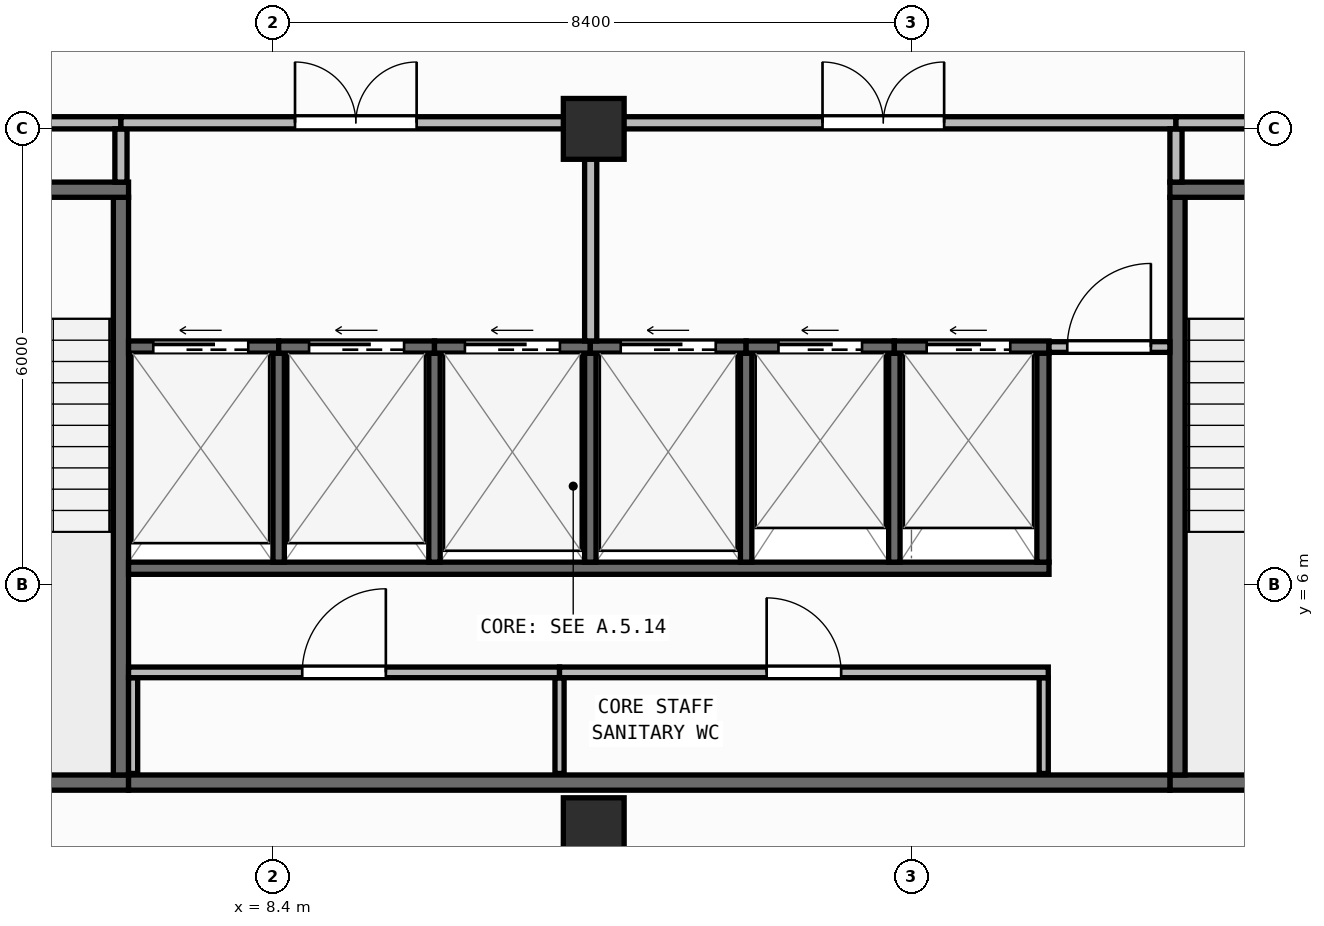
"""IFC4 building model, lengths in metres.
Left out: names, types, materials, properties, quantities, classifications, styles, units other than length and angle.
Written with IfcOpenShell. Run it as: python <this file> out.ifc"""

import sys

from ifc_helpers import new_model, si_unit, direction, frame, frame_2d, origin, origin_2d, place, context, subcontext, project, spatial, rectangle, extrude, element, fill, save


model = new_model("IFC4")
c1 = context("Model", 3, precision=1e-05, world=origin(), true_north=direction((0.0, 1.0)))
c2 = subcontext(c1, "Body", "Model", "MODEL_VIEW")
j1 = project(units=[si_unit("LENGTHUNIT", "METRE"), si_unit("PLANEANGLEUNIT", "RADIAN")], contexts=[c1])
p1 = place(None, origin())
s1 = spatial("IfcSite", under=j1, at=p1, CompositionType="ELEMENT")
p2 = place(p1, origin())
s2 = spatial("IfcBuilding", under=s1, at=p2, CompositionType="ELEMENT")
p3 = place(p2, frame((0.0, 0.0, 280.25)))
s3 = spatial("IfcBuildingStorey", under=s2, at=p3, CompositionType="ELEMENT", Elevation=280.25)
for number, where, z_axis, x_axis in (
    (1, (12.62, 2.8, 0.0), (0.0, 0.0, 1.0), (1.0, 0.0, 0.0)),
    (2, (12.62, 12.0, 0.0), (0.0, 0.0, 1.0), (1.0, 0.0, 0.0)),
):
    element("IfcColumn", number, at=place(p3, frame(where, z_axis=z_axis, x_axis=x_axis)), inside=s3, PredefinedType="COLUMN", context=c2, shape_type="SweptSolid", body=[
        extrude(rectangle(XDim=0.8, YDim=0.8, at=origin_2d()), origin(), (0.0, 0.0, 1.0), 3.95),
    ])
p4 = place(p3, frame((2.46, 0.172, 0.0), z_axis=(0.0, 0.0, 1.0), x_axis=(0.997289775118, 0.073573802713, 0.0)))
e3 = element("IfcWall", 3, at=p4, inside=s3, PredefinedType="STANDARD", context=c2, shape_type="SweptSolid", body=[
    extrude(rectangle(XDim=36.379, YDim=0.26, at=frame_2d((18.189, 0.0))), origin(), (0.0, 0.0, 1.0), 3.71),
])
p5 = place(p4, frame((16.989, 0.0, 0.9)))
e4 = element("IfcOpeningElement", 4, at=p5, cuts=e3, PredefinedType="OPENING", context=c2, shape_type="SweptSolid", body=[
    extrude(rectangle(XDim=2.4, YDim=1.65, at=frame_2d((1.2, 0.825))), frame((0.0, 0.14, 0.0), z_axis=(0.0, -1.0, 0.0), x_axis=(1.0, 0.0, 0.0)), (0.0, 0.0, 1.0), 0.28),
])
p6 = place(p3, frame((2.8, 3.4, 0.0), z_axis=(0.0, 0.0, 1.0), x_axis=(1.0, 0.0, 0.0)))
e5 = element("IfcWall", 5, at=p6, inside=s3, PredefinedType="SHEAR", context=c2, shape_type="SweptSolid", body=[
    extrude(rectangle(XDim=3.7, YDim=0.2, at=frame_2d((1.85, 0.0))), origin(), (0.0, 0.0, 1.0), 3.71),
])
p7 = place(p3, frame((6.4, 3.5, 0.0), z_axis=(0.0, 0.0, 1.0), x_axis=(0.0, 1.0, 0.0)))
e6 = element("IfcWall", 6, at=p7, inside=s3, PredefinedType="SHEAR", context=c2, shape_type="SweptSolid", body=[
    extrude(rectangle(XDim=7.6, YDim=0.2, at=frame_2d((3.8, 0.0))), origin(), (0.0, 0.0, 1.0), 3.71),
])
p8 = place(p3, frame((2.8, 11.2, 0.0), z_axis=(0.0, 0.0, 1.0), x_axis=(1.0, 0.0, 0.0)))
e7 = element("IfcWall", 7, at=p8, inside=s3, PredefinedType="SHEAR", context=c2, shape_type="SweptSolid", body=[
    extrude(rectangle(XDim=3.7, YDim=0.2, at=frame_2d((1.85, 0.0))), origin(), (0.0, 0.0, 1.0), 3.71),
])
p9 = place(p8, frame((1.2, 0.0, 0.0)))
e8 = element("IfcOpeningElement", 8, at=p9, cuts=e7, PredefinedType="OPENING", context=c2, shape_type="SweptSolid", body=[
    extrude(rectangle(XDim=1.3, YDim=2.15, at=frame_2d((0.65, 1.075))), frame((0.0, 0.11, 0.0), z_axis=(0.0, -1.0, 0.0), x_axis=(1.0, 0.0, 0.0)), (0.0, 0.0, 1.0), 0.22),
])
p10 = place(p3, frame((20.2, 3.4, 0.0), z_axis=(0.0, 0.0, 1.0), x_axis=(1.0, 0.0, 0.0)))
e9 = element("IfcWall", 9, at=p10, inside=s3, PredefinedType="SHEAR", context=c2, shape_type="SweptSolid", body=[
    extrude(rectangle(XDim=3.7, YDim=0.2, at=frame_2d((1.85, 0.0))), origin(), (0.0, 0.0, 1.0), 3.71),
])
p11 = place(p3, frame((20.3, 3.5, 0.0), z_axis=(0.0, 0.0, 1.0), x_axis=(0.0, 1.0, 0.0)))
e10 = element("IfcWall", 10, at=p11, inside=s3, PredefinedType="SHEAR", context=c2, shape_type="SweptSolid", body=[
    extrude(rectangle(XDim=7.6, YDim=0.2, at=frame_2d((3.8, 0.0))), origin(), (0.0, 0.0, 1.0), 3.71),
])
p12 = place(p3, frame((20.2, 11.2, 0.0), z_axis=(0.0, 0.0, 1.0), x_axis=(1.0, 0.0, 0.0)))
e11 = element("IfcWall", 11, at=p12, inside=s3, PredefinedType="SHEAR", context=c2, shape_type="SweptSolid", body=[
    extrude(rectangle(XDim=3.7, YDim=0.2, at=frame_2d((1.85, 0.0))), origin(), (0.0, 0.0, 1.0), 3.71),
])
p13 = place(p12, frame((1.2, 0.0, 0.0)))
e12 = element("IfcOpeningElement", 12, at=p13, cuts=e11, PredefinedType="OPENING", context=c2, shape_type="SweptSolid", body=[
    extrude(rectangle(XDim=1.3, YDim=2.15, at=frame_2d((0.65, 1.075))), frame((0.0, 0.11, 0.0), z_axis=(0.0, -1.0, 0.0), x_axis=(1.0, 0.0, 0.0)), (0.0, 0.0, 1.0), 0.22),
])
p14 = place(p3, frame((6.5, 3.4, 0.0), z_axis=(0.0, 0.0, 1.0), x_axis=(1.0, 0.0, 0.0)))
e13 = element("IfcWall", 13, at=p14, inside=s3, PredefinedType="SHEAR", context=c2, shape_type="SweptSolid", body=[
    extrude(rectangle(XDim=13.7, YDim=0.2, at=frame_2d((6.85, 0.0))), origin(), (0.0, 0.0, 1.0), 3.71),
])
p15 = place(p3, frame((6.5, 6.22, 0.0), z_axis=(0.0, 0.0, 1.0), x_axis=(1.0, 0.0, 0.0)))
e14 = element("IfcWall", 14, at=p15, inside=s3, PredefinedType="SHEAR", context=c2, shape_type="SweptSolid", body=[
    extrude(rectangle(XDim=12.11, YDim=0.16, at=frame_2d((6.055, 0.0))), origin(), (0.0, 0.0, 1.0), 3.71),
])
p16 = place(p3, frame((18.53, 6.3, 0.0), z_axis=(0.0, 0.0, 1.0), x_axis=(0.0, 1.0, 0.0)))
e15 = element("IfcWall", 15, at=p16, inside=s3, PredefinedType="SHEAR", context=c2, shape_type="SweptSolid", body=[
    extrude(rectangle(XDim=2.75, YDim=0.16, at=frame_2d((1.375, 0.0))), origin(), (0.0, 0.0, 1.0), 3.71),
])
for number, where, z_axis, x_axis in (
    (16, (8.475, 6.3, 0.0), (0.0, 0.0, 1.0), (0.0, 1.0, 0.0)),
    (17, (10.525, 6.3, 0.0), (0.0, 0.0, 1.0), (0.0, 1.0, 0.0)),
    (18, (12.575, 6.3, 0.0), (0.0, 0.0, 1.0), (0.0, 1.0, 0.0)),
    (19, (14.625, 6.3, 0.0), (0.0, 0.0, 1.0), (0.0, 1.0, 0.0)),
    (20, (16.575, 6.3, 0.0), (0.0, 0.0, 1.0), (0.0, 1.0, 0.0)),
):
    element("IfcWall", number, at=place(p3, frame(where, z_axis=z_axis, x_axis=x_axis)), inside=s3, PredefinedType="SHEAR", context=c2, shape_type="SweptSolid", body=[
        extrude(rectangle(XDim=2.75, YDim=0.15, at=frame_2d((1.375, 0.0))), origin(), (0.0, 0.0, 1.0), 3.71),
    ])
p17 = place(p3, frame((6.5, 9.13, 0.0), z_axis=(0.0, 0.0, 1.0), x_axis=(1.0, 0.0, 0.0)))
e21 = element("IfcWall", 21, at=p17, inside=s3, PredefinedType="SHEAR", context=c2, shape_type="SweptSolid", body=[
    extrude(rectangle(XDim=1.975, YDim=0.16, at=frame_2d((0.988, 0.0))), origin(), (0.0, 0.0, 1.0), 3.71),
])
p18 = place(p17, frame((0.325, 0.0, 0.0)))
e22 = element("IfcOpeningElement", 22, at=p18, cuts=e21, PredefinedType="OPENING", context=c2, shape_type="SweptSolid", body=[
    extrude(rectangle(XDim=1.25, YDim=2.15, at=frame_2d((0.625, 1.075))), frame((0.0, 0.09, 0.0), z_axis=(0.0, -1.0, 0.0), x_axis=(1.0, 0.0, 0.0)), (0.0, 0.0, 1.0), 0.18),
])
p19 = place(p3, frame((8.475, 9.13, 0.0), z_axis=(0.0, 0.0, 1.0), x_axis=(1.0, 0.0, 0.0)))
e23 = element("IfcWall", 23, at=p19, inside=s3, PredefinedType="SHEAR", context=c2, shape_type="SweptSolid", body=[
    extrude(rectangle(XDim=2.05, YDim=0.16, at=frame_2d((1.025, 0.0))), origin(), (0.0, 0.0, 1.0), 3.71),
])
p20 = place(p19, frame((0.4, 0.0, 0.0)))
e24 = element("IfcOpeningElement", 24, at=p20, cuts=e23, PredefinedType="OPENING", context=c2, shape_type="SweptSolid", body=[
    extrude(rectangle(XDim=1.25, YDim=2.15, at=frame_2d((0.625, 1.075))), frame((0.0, 0.09, 0.0), z_axis=(0.0, -1.0, 0.0), x_axis=(1.0, 0.0, 0.0)), (0.0, 0.0, 1.0), 0.18),
])
p21 = place(p3, frame((10.525, 9.13, 0.0), z_axis=(0.0, 0.0, 1.0), x_axis=(1.0, 0.0, 0.0)))
e25 = element("IfcWall", 25, at=p21, inside=s3, PredefinedType="SHEAR", context=c2, shape_type="SweptSolid", body=[
    extrude(rectangle(XDim=2.05, YDim=0.16, at=frame_2d((1.025, 0.0))), origin(), (0.0, 0.0, 1.0), 3.71),
])
p22 = place(p21, frame((0.4, 0.0, 0.0)))
e26 = element("IfcOpeningElement", 26, at=p22, cuts=e25, PredefinedType="OPENING", context=c2, shape_type="SweptSolid", body=[
    extrude(rectangle(XDim=1.25, YDim=2.15, at=frame_2d((0.625, 1.075))), frame((0.0, 0.09, 0.0), z_axis=(0.0, -1.0, 0.0), x_axis=(1.0, 0.0, 0.0)), (0.0, 0.0, 1.0), 0.18),
])
p23 = place(p3, frame((12.575, 9.13, 0.0), z_axis=(0.0, 0.0, 1.0), x_axis=(1.0, 0.0, 0.0)))
e27 = element("IfcWall", 27, at=p23, inside=s3, PredefinedType="SHEAR", context=c2, shape_type="SweptSolid", body=[
    extrude(rectangle(XDim=2.05, YDim=0.16, at=frame_2d((1.025, 0.0))), origin(), (0.0, 0.0, 1.0), 3.71),
])
p24 = place(p23, frame((0.4, 0.0, 0.0)))
e28 = element("IfcOpeningElement", 28, at=p24, cuts=e27, PredefinedType="OPENING", context=c2, shape_type="SweptSolid", body=[
    extrude(rectangle(XDim=1.25, YDim=2.15, at=frame_2d((0.625, 1.075))), frame((0.0, 0.09, 0.0), z_axis=(0.0, -1.0, 0.0), x_axis=(1.0, 0.0, 0.0)), (0.0, 0.0, 1.0), 0.18),
])
p25 = place(p3, frame((14.625, 9.13, 0.0), z_axis=(0.0, 0.0, 1.0), x_axis=(1.0, 0.0, 0.0)))
e29 = element("IfcWall", 29, at=p25, inside=s3, PredefinedType="SHEAR", context=c2, shape_type="SweptSolid", body=[
    extrude(rectangle(XDim=1.95, YDim=0.16, at=frame_2d((0.975, 0.0))), origin(), (0.0, 0.0, 1.0), 3.71),
])
p26 = place(p25, frame((0.425, 0.0, 0.0)))
e30 = element("IfcOpeningElement", 30, at=p26, cuts=e29, PredefinedType="OPENING", context=c2, shape_type="SweptSolid", body=[
    extrude(rectangle(XDim=1.1, YDim=2.15, at=frame_2d((0.55, 1.075))), frame((0.0, 0.09, 0.0), z_axis=(0.0, -1.0, 0.0), x_axis=(1.0, 0.0, 0.0)), (0.0, 0.0, 1.0), 0.18),
])
p27 = place(p3, frame((16.575, 9.13, 0.0), z_axis=(0.0, 0.0, 1.0), x_axis=(1.0, 0.0, 0.0)))
e31 = element("IfcWall", 31, at=p27, inside=s3, PredefinedType="SHEAR", context=c2, shape_type="SweptSolid", body=[
    extrude(rectangle(XDim=2.035, YDim=0.16, at=frame_2d((1.018, 0.0))), origin(), (0.0, 0.0, 1.0), 3.71),
])
p28 = place(p27, frame((0.425, 0.0, 0.0)))
e32 = element("IfcOpeningElement", 32, at=p28, cuts=e31, PredefinedType="OPENING", context=c2, shape_type="SweptSolid", body=[
    extrude(rectangle(XDim=1.1, YDim=2.15, at=frame_2d((0.55, 1.075))), frame((0.0, 0.09, 0.0), z_axis=(0.0, -1.0, 0.0), x_axis=(1.0, 0.0, 0.0)), (0.0, 0.0, 1.0), 0.18),
])
for number, where, z_axis, x_axis in (
    (33, (6.56, 3.52, 0.0), (0.0, 0.0, 1.0), (0.0, 1.0, 0.0)),
    (34, (12.17, 3.52, 0.0), (0.0, 0.0, 1.0), (0.0, 1.0, 0.0)),
    (35, (18.54, 3.52, 0.0), (0.0, 0.0, 1.0), (0.0, 1.0, 0.0)),
):
    element("IfcWall", number, at=place(p3, frame(where, z_axis=z_axis, x_axis=x_axis)), inside=s3, PredefinedType="PARTITIONING", context=c2, shape_type="SweptSolid", body=[
        extrude(rectangle(XDim=1.26, YDim=0.12, at=frame_2d((0.63, 0.0))), origin(), (0.0, 0.0, 1.0), 3.71),
    ])
p29 = place(p3, frame((6.5, 4.85, 0.0), z_axis=(0.0, 0.0, 1.0), x_axis=(1.0, 0.0, 0.0)))
e36 = element("IfcWall", 36, at=p29, inside=s3, PredefinedType="PARTITIONING", context=c2, shape_type="SweptSolid", body=[
    extrude(rectangle(XDim=5.67, YDim=0.14, at=frame_2d((2.835, 0.0))), origin(), (0.0, 0.0, 1.0), 3.71),
])
p30 = place(p29, frame((2.285, 0.0, 0.0)))
e37 = element("IfcOpeningElement", 37, at=p30, cuts=e36, PredefinedType="OPENING", context=c2, shape_type="SweptSolid", body=[
    extrude(rectangle(XDim=1.1, YDim=2.1, at=frame_2d((0.55, 1.05))), frame((0.0, 0.08, 0.0), z_axis=(0.0, -1.0, 0.0), x_axis=(1.0, 0.0, 0.0)), (0.0, 0.0, 1.0), 0.16),
])
p31 = place(p3, frame((12.17, 4.85, 0.0), z_axis=(0.0, 0.0, 1.0), x_axis=(1.0, 0.0, 0.0)))
e38 = element("IfcWall", 38, at=p31, inside=s3, PredefinedType="PARTITIONING", context=c2, shape_type="SweptSolid", body=[
    extrude(rectangle(XDim=6.43, YDim=0.14, at=frame_2d((3.215, 0.0))), origin(), (0.0, 0.0, 1.0), 3.71),
])
p32 = place(p31, frame((2.725, 0.0, 0.0)))
e39 = element("IfcOpeningElement", 39, at=p32, cuts=e38, PredefinedType="OPENING", context=c2, shape_type="SweptSolid", body=[
    extrude(rectangle(XDim=0.98, YDim=2.1, at=frame_2d((0.49, 1.05))), frame((0.0, 0.08, 0.0), z_axis=(0.0, -1.0, 0.0), x_axis=(1.0, 0.0, 0.0)), (0.0, 0.0, 1.0), 0.16),
])
p33 = place(p3, frame((18.61, 9.13, 0.0), z_axis=(0.0, 0.0, 1.0), x_axis=(1.0, 0.0, 0.0)))
e40 = element("IfcWall", 40, at=p33, inside=s3, PredefinedType="PARTITIONING", context=c2, shape_type="SweptSolid", body=[
    extrude(rectangle(XDim=1.59, YDim=0.14, at=frame_2d((0.795, 0.0))), origin(), (0.0, 0.0, 1.0), 3.71),
])
p34 = place(p33, frame((0.24, 0.0, 0.0)))
e41 = element("IfcOpeningElement", 41, at=p34, cuts=e40, PredefinedType="OPENING", context=c2, shape_type="SweptSolid", body=[
    extrude(rectangle(XDim=1.1, YDim=2.1, at=frame_2d((0.55, 1.05))), frame((0.0, 0.08, 0.0), z_axis=(0.0, -1.0, 0.0), x_axis=(1.0, 0.0, 0.0)), (0.0, 0.0, 1.0), 0.16),
])
p35 = place(p3, frame((2.8, 12.08, 0.0), z_axis=(0.0, 0.0, 1.0), x_axis=(1.0, 0.0, 0.0)))
e42 = element("IfcWall", 42, at=p35, inside=s3, PredefinedType="PARTITIONING", context=c2, shape_type="SweptSolid", body=[
    extrude(rectangle(XDim=3.6, YDim=0.16, at=frame_2d((1.8, 0.0))), origin(), (0.0, 0.0, 1.0), 3.157),
])
p36 = place(p35, frame((1.0, 0.0, 0.0)))
e43 = element("IfcOpeningElement", 43, at=p36, cuts=e42, PredefinedType="OPENING", context=c2, shape_type="SweptSolid", body=[
    extrude(rectangle(XDim=1.6, YDim=2.05, at=frame_2d((0.8, 1.025))), frame((0.0, 0.09, 0.0), z_axis=(0.0, -1.0, 0.0), x_axis=(1.0, 0.0, 0.0)), (0.0, 0.0, 1.0), 0.18),
])
p37 = place(p3, frame((6.4, 11.3, 0.0), z_axis=(0.0, 0.0, 1.0), x_axis=(0.0, 1.0, 0.0)))
e44 = element("IfcWall", 44, at=p37, inside=s3, PredefinedType="PARTITIONING", context=c2, shape_type="SweptSolid", body=[
    extrude(rectangle(XDim=0.7, YDim=0.16, at=frame_2d((0.35, 0.0))), origin(), (0.0, 0.0, 1.0), 3.71),
])
p38 = place(p3, frame((6.4, 12.08, 0.0), z_axis=(0.0, 0.0, 1.0), x_axis=(1.0, 0.0, 0.0)))
e45 = element("IfcWall", 45, at=p38, inside=s3, PredefinedType="PARTITIONING", context=c2, shape_type="SweptSolid", body=[
    extrude(rectangle(XDim=6.18, YDim=0.16, at=frame_2d((3.09, 0.0))), origin(), (0.0, 0.0, 1.0), 3.157),
])
p39 = place(p38, frame((2.29, 0.0, 0.0)))
e46 = element("IfcOpeningElement", 46, at=p39, cuts=e45, PredefinedType="OPENING", context=c2, shape_type="SweptSolid", body=[
    extrude(rectangle(XDim=1.6, YDim=2.05, at=frame_2d((0.8, 1.025))), frame((0.0, 0.09, 0.0), z_axis=(0.0, -1.0, 0.0), x_axis=(1.0, 0.0, 0.0)), (0.0, 0.0, 1.0), 0.18),
])
p40 = place(p3, frame((12.58, 9.21, 0.0), z_axis=(0.0, 0.0, 1.0), x_axis=(0.0, 1.0, 0.0)))
e47 = element("IfcWall", 47, at=p40, inside=s3, PredefinedType="PARTITIONING", context=c2, shape_type="SweptSolid", body=[
    extrude(rectangle(XDim=2.79, YDim=0.16, at=frame_2d((1.395, 0.0))), origin(), (0.0, 0.0, 1.0), 3.71),
])
p41 = place(p3, frame((12.58, 12.08, 0.0), z_axis=(0.0, 0.0, 1.0), x_axis=(1.0, 0.0, 0.0)))
e48 = element("IfcWall", 48, at=p41, inside=s3, PredefinedType="PARTITIONING", context=c2, shape_type="SweptSolid", body=[
    extrude(rectangle(XDim=7.7, YDim=0.16, at=frame_2d((3.85, 0.0))), origin(), (0.0, 0.0, 1.0), 3.157),
])
p42 = place(p41, frame((3.05, 0.0, 0.0)))
e49 = element("IfcOpeningElement", 49, at=p42, cuts=e48, PredefinedType="OPENING", context=c2, shape_type="SweptSolid", body=[
    extrude(rectangle(XDim=1.6, YDim=2.05, at=frame_2d((0.8, 1.025))), frame((0.0, 0.09, 0.0), z_axis=(0.0, -1.0, 0.0), x_axis=(1.0, 0.0, 0.0)), (0.0, 0.0, 1.0), 0.18),
])
p43 = place(p3, frame((20.28, 11.3, 0.0), z_axis=(0.0, 0.0, 1.0), x_axis=(0.0, 1.0, 0.0)))
e50 = element("IfcWall", 50, at=p43, inside=s3, PredefinedType="PARTITIONING", context=c2, shape_type="SweptSolid", body=[
    extrude(rectangle(XDim=0.7, YDim=0.16, at=frame_2d((0.35, 0.0))), origin(), (0.0, 0.0, 1.0), 3.71),
])
p44 = place(p3, frame((20.28, 12.08, 0.0), z_axis=(0.0, 0.0, 1.0), x_axis=(1.0, 0.0, 0.0)))
e51 = element("IfcWall", 51, at=p44, inside=s3, PredefinedType="PARTITIONING", context=c2, shape_type="SweptSolid", body=[
    extrude(rectangle(XDim=3.62, YDim=0.16, at=frame_2d((1.81, 0.0))), origin(), (0.0, 0.0, 1.0), 3.157),
])
p45 = place(p44, frame((1.01, 0.0, 0.0)))
e52 = element("IfcOpeningElement", 52, at=p45, cuts=e51, PredefinedType="OPENING", context=c2, shape_type="SweptSolid", body=[
    extrude(rectangle(XDim=1.6, YDim=2.05, at=frame_2d((0.8, 1.025))), frame((0.0, 0.09, 0.0), z_axis=(0.0, -1.0, 0.0), x_axis=(1.0, 0.0, 0.0)), (0.0, 0.0, 1.0), 0.18),
])
p46 = place(p18, origin())
e53 = element("IfcDoor", 53, at=p46, inside=s3, OperationType="SLIDING_TO_LEFT", PredefinedType="DOOR", context=c2, shape_type="SweptSolid", body=[
    extrude(rectangle(XDim=1.25, YDim=2.15, at=frame_2d((0.625, 1.075))), frame((0.0, 0.025, 0.0), z_axis=(0.0, -1.0, 0.0), x_axis=(1.0, 0.0, 0.0)), (0.0, 0.0, 1.0), 0.05),
])
fill(e22, e53)
p47 = place(p20, origin())
e54 = element("IfcDoor", 54, at=p47, inside=s3, OperationType="SLIDING_TO_LEFT", PredefinedType="DOOR", context=c2, shape_type="SweptSolid", body=[
    extrude(rectangle(XDim=1.25, YDim=2.15, at=frame_2d((0.625, 1.075))), frame((0.0, 0.025, 0.0), z_axis=(0.0, -1.0, 0.0), x_axis=(1.0, 0.0, 0.0)), (0.0, 0.0, 1.0), 0.05),
])
fill(e24, e54)
p48 = place(p22, origin())
e55 = element("IfcDoor", 55, at=p48, inside=s3, OperationType="SLIDING_TO_LEFT", PredefinedType="DOOR", context=c2, shape_type="SweptSolid", body=[
    extrude(rectangle(XDim=1.25, YDim=2.15, at=frame_2d((0.625, 1.075))), frame((0.0, 0.025, 0.0), z_axis=(0.0, -1.0, 0.0), x_axis=(1.0, 0.0, 0.0)), (0.0, 0.0, 1.0), 0.05),
])
fill(e26, e55)
p49 = place(p24, origin())
e56 = element("IfcDoor", 56, at=p49, inside=s3, OperationType="SLIDING_TO_LEFT", PredefinedType="DOOR", context=c2, shape_type="SweptSolid", body=[
    extrude(rectangle(XDim=1.25, YDim=2.15, at=frame_2d((0.625, 1.075))), frame((0.0, 0.025, 0.0), z_axis=(0.0, -1.0, 0.0), x_axis=(1.0, 0.0, 0.0)), (0.0, 0.0, 1.0), 0.05),
])
fill(e28, e56)
p50 = place(p26, origin())
e57 = element("IfcDoor", 57, at=p50, inside=s3, OperationType="SLIDING_TO_LEFT", PredefinedType="DOOR", context=c2, shape_type="SweptSolid", body=[
    extrude(rectangle(XDim=1.1, YDim=2.15, at=frame_2d((0.55, 1.075))), frame((0.0, 0.025, 0.0), z_axis=(0.0, -1.0, 0.0), x_axis=(1.0, 0.0, 0.0)), (0.0, 0.0, 1.0), 0.05),
])
fill(e30, e57)
p51 = place(p28, origin())
e58 = element("IfcDoor", 58, at=p51, inside=s3, OperationType="SLIDING_TO_LEFT", PredefinedType="DOOR", context=c2, shape_type="SweptSolid", body=[
    extrude(rectangle(XDim=1.1, YDim=2.15, at=frame_2d((0.55, 1.075))), frame((0.0, 0.025, 0.0), z_axis=(0.0, -1.0, 0.0), x_axis=(1.0, 0.0, 0.0)), (0.0, 0.0, 1.0), 0.05),
])
fill(e32, e58)
p52 = place(p30, origin())
e59 = element("IfcDoor", 59, at=p52, inside=s3, OperationType="SINGLE_SWING_RIGHT", PredefinedType="DOOR", context=c2, shape_type="SweptSolid", body=[
    extrude(rectangle(XDim=1.1, YDim=2.1, at=frame_2d((0.55, 1.05))), frame((0.0, 0.025, 0.0), z_axis=(0.0, -1.0, 0.0), x_axis=(1.0, 0.0, 0.0)), (0.0, 0.0, 1.0), 0.05),
])
fill(e37, e59)
p53 = place(p32, origin())
e60 = element("IfcDoor", 60, at=p53, inside=s3, OperationType="SINGLE_SWING_LEFT", PredefinedType="DOOR", context=c2, shape_type="SweptSolid", body=[
    extrude(rectangle(XDim=0.98, YDim=2.1, at=frame_2d((0.49, 1.05))), frame((0.0, 0.025, 0.0), z_axis=(0.0, -1.0, 0.0), x_axis=(1.0, 0.0, 0.0)), (0.0, 0.0, 1.0), 0.05),
])
fill(e39, e60)
p54 = place(p34, origin())
e61 = element("IfcDoor", 61, at=p54, inside=s3, OperationType="SINGLE_SWING_RIGHT", PredefinedType="DOOR", context=c2, shape_type="SweptSolid", body=[
    extrude(rectangle(XDim=1.1, YDim=2.1, at=frame_2d((0.55, 1.05))), frame((0.0, 0.025, 0.0), z_axis=(0.0, -1.0, 0.0), x_axis=(1.0, 0.0, 0.0)), (0.0, 0.0, 1.0), 0.05),
])
fill(e41, e61)
p55 = place(p39, origin())
e62 = element("IfcDoor", 62, at=p55, inside=s3, OperationType="DOUBLE_DOOR_SINGLE_SWING", PredefinedType="DOOR", context=c2, shape_type="SweptSolid", body=[
    extrude(rectangle(XDim=1.6, YDim=2.05, at=frame_2d((0.8, 1.025))), frame((0.0, 0.025, 0.0), z_axis=(0.0, -1.0, 0.0), x_axis=(1.0, 0.0, 0.0)), (0.0, 0.0, 1.0), 0.05),
])
fill(e46, e62)
p56 = place(p42, origin())
e63 = element("IfcDoor", 63, at=p56, inside=s3, OperationType="DOUBLE_DOOR_SINGLE_SWING", PredefinedType="DOOR", context=c2, shape_type="SweptSolid", body=[
    extrude(rectangle(XDim=1.6, YDim=2.05, at=frame_2d((0.8, 1.025))), frame((0.0, 0.025, 0.0), z_axis=(0.0, -1.0, 0.0), x_axis=(1.0, 0.0, 0.0)), (0.0, 0.0, 1.0), 0.05),
])
fill(e49, e63)
save(model, sys.argv[1])
